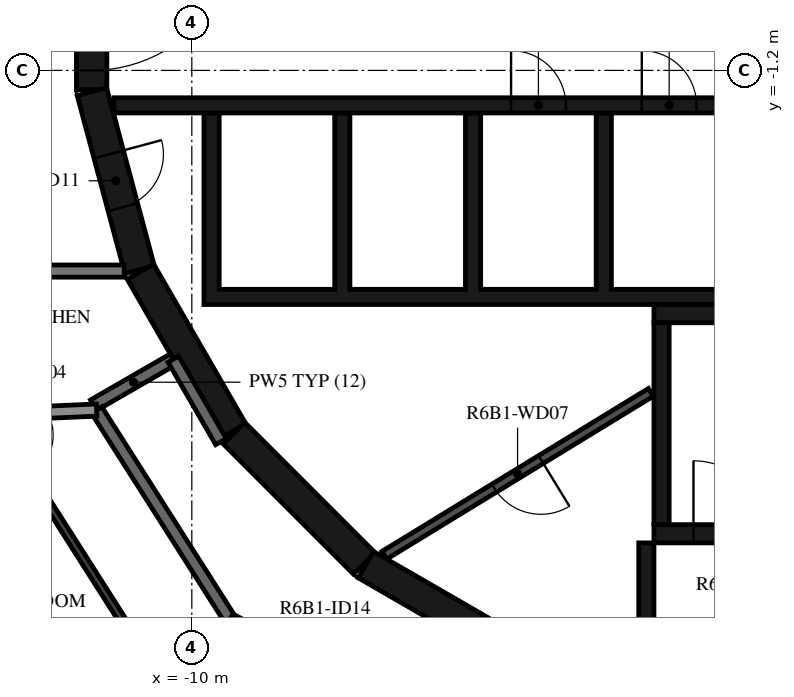
"""IFC4 building model, lengths in metres.
Left out: names, types, materials, properties, quantities, classifications, styles, units other than length and angle.
Written with IfcOpenShell. Run it as: python <this file> out.ifc"""

import sys

from ifc_helpers import new_model, si_unit, direction, frame, frame_2d, origin, place, context, subcontext, project, spatial, polyline, rectangle, outline, extrude, element, fill, save


model = new_model("IFC4")
c1 = context("Model", 3, precision=1e-05, world=origin(), true_north=direction((0.0, 1.0)))
c2 = subcontext(c1, "Body", "Model", "MODEL_VIEW")
j1 = project(units=[si_unit("LENGTHUNIT", "METRE"), si_unit("PLANEANGLEUNIT", "RADIAN")], contexts=[c1])
p1 = place(None, origin())
s1 = spatial("IfcSite", under=j1, at=p1, CompositionType="ELEMENT")
p2 = place(p1, origin())
s2 = spatial("IfcBuilding", under=s1, at=p2, CompositionType="ELEMENT")
p3 = place(p2, frame((0.0, 0.0, 237.2)))
s3 = spatial("IfcBuildingStorey", under=s2, at=p3, CompositionType="ELEMENT", Elevation=237.2)
p4 = place(p3, frame((-11.647, 1.516, 0.0), z_axis=(0.0, 0.0, 1.0), x_axis=(0.0, -1.0, 0.0)))
e1 = element("IfcWall", 1, at=p4, inside=s3, PredefinedType="SHEAR", context=c2, shape_type="SweptSolid", body=[
    extrude(rectangle(XDim=3.033, YDim=0.5, at=frame_2d((1.516, 0.0))), origin(), (0.0, 0.0, 1.0), 3.12),
])
p5 = place(p4, frame((0.316, 0.0, 0.0)))
e2 = element("IfcOpeningElement", 2, at=p5, cuts=e1, PredefinedType="OPENING", context=c2, shape_type="SweptSolid", body=[
    extrude(rectangle(XDim=2.4, YDim=2.1, at=frame_2d((1.2, 1.05))), frame((0.0, 0.26, 0.0), z_axis=(0.0, -1.0, 0.0), x_axis=(1.0, 0.0, 0.0)), (0.0, 0.0, 1.0), 0.52),
])
p6 = place(p3, frame((-11.643, -1.55, 0.0), z_axis=(0.0, 0.0, 1.0), x_axis=(0.258734743916, -0.965948410781, 0.0)))
e3 = element("IfcWall", 3, at=p6, inside=s3, PredefinedType="SHEAR", context=c2, shape_type="SweptSolid", body=[
    extrude(rectangle(XDim=3.033, YDim=0.5, at=frame_2d((1.516, 0.0))), origin(), (0.0, 0.0, 1.0), 3.12),
])
p7 = place(p6, frame((1.066, 0.0, 0.0)))
e4 = element("IfcOpeningElement", 4, at=p7, cuts=e3, PredefinedType="OPENING", context=c2, shape_type="SweptSolid", body=[
    extrude(rectangle(XDim=0.9, YDim=2.1, at=frame_2d((0.45, 1.05))), frame((0.0, 0.26, 0.0), z_axis=(0.0, -1.0, 0.0), x_axis=(1.0, 0.0, 0.0)), (0.0, 0.0, 1.0), 0.52),
])
p8 = place(p3, frame((-10.845, -4.51, 0.0), z_axis=(0.0, 0.0, 1.0), x_axis=(0.500087131594, -0.865975092491, 0.0)))
e5 = element("IfcWall", 5, at=p8, inside=s3, PredefinedType="SHEAR", context=c2, shape_type="SweptSolid", body=[
    extrude(rectangle(XDim=3.033, YDim=0.5, at=frame_2d((1.516, 0.0))), origin(), (0.0, 0.0, 1.0), 3.12),
])
p9 = place(p3, frame((-9.308, -7.164, 0.0), z_axis=(0.0, 0.0, 1.0), x_axis=(0.707106781187, -0.707106781187, 0.0)))
e6 = element("IfcWall", 6, at=p9, inside=s3, PredefinedType="SHEAR", context=c2, shape_type="SweptSolid", body=[
    extrude(rectangle(XDim=3.032, YDim=0.5, at=frame_2d((1.516, 0.0))), origin(), (0.0, 0.0, 1.0), 3.12),
])
p10 = place(p3, frame((-7.137, -9.329, 0.0), z_axis=(0.0, 0.0, 1.0), x_axis=(0.865975092491, -0.500087131594, 0.0)))
e7 = element("IfcWall", 7, at=p10, inside=s3, PredefinedType="SHEAR", context=c2, shape_type="SweptSolid", body=[
    extrude(rectangle(XDim=3.033, YDim=0.5, at=frame_2d((1.516, 0.0))), origin(), (0.0, 0.0, 1.0), 3.12),
])
p11 = place(p3, frame((-2.275, -8.67, 0.0), z_axis=(0.0, 0.0, 1.0), x_axis=(0.0, 1.0, 0.0)))
e8 = element("IfcWall", 8, at=p11, inside=s3, PredefinedType="SHEAR", context=c2, shape_type="SweptSolid", body=[
    extrude(rectangle(XDim=3.32, YDim=0.25, at=frame_2d((1.66, 0.0))), origin(), (0.0, 0.0, 1.0), 3.12),
])
p12 = place(p3, frame((-2.4, -5.2, 0.0), z_axis=(0.0, 0.0, 1.0), x_axis=(1.0, 0.0, 0.0)))
e9 = element("IfcWall", 9, at=p12, inside=s3, PredefinedType="SHEAR", context=c2, shape_type="SweptSolid", body=[
    extrude(rectangle(XDim=7.05, YDim=0.3, at=frame_2d((3.525, 0.0))), origin(), (0.0, 0.0, 1.0), 3.12),
])
p13 = place(p3, frame((-2.4, -8.82, 0.0), z_axis=(0.0, 0.0, 1.0), x_axis=(1.0, 0.0, 0.0)))
e10 = element("IfcWall", 10, at=p13, inside=s3, PredefinedType="SHEAR", context=c2, shape_type="SweptSolid", body=[
    extrude(rectangle(XDim=2.5, YDim=0.3, at=frame_2d((1.25, 0.0))), origin(), (0.0, 0.0, 1.0), 3.12),
])
p14 = place(p13, frame((0.65, 0.0, 0.0)))
e11 = element("IfcOpeningElement", 11, at=p14, cuts=e10, PredefinedType="OPENING", context=c2, shape_type="SweptSolid", body=[
    extrude(rectangle(XDim=1.2, YDim=2.1, at=frame_2d((0.6, 1.05))), frame((0.0, 0.16, 0.0), z_axis=(0.0, -1.0, 0.0), x_axis=(1.0, 0.0, 0.0)), (0.0, 0.0, 1.0), 0.32),
])
p15 = place(p3, frame((-2.525, -8.97, 0.0), z_axis=(0.0, 0.0, 1.0), x_axis=(0.0, -1.0, 0.0)))
e12 = element("IfcWall", 12, at=p15, inside=s3, PredefinedType="SHEAR", context=c2, shape_type="SweptSolid", body=[
    extrude(rectangle(XDim=2.11, YDim=0.25, at=frame_2d((1.055, 0.0))), origin(), (0.0, 0.0, 1.0), 3.12),
])
p16 = place(p3, origin())
e13 = element("IfcWall", 13, at=p16, inside=s3, PredefinedType="SHEAR", context=c2, shape_type="SweptSolid", body=[
    extrude(outline(polyline([(9.8, -5.05), (9.8, -4.8), (9.8, -1.9), (9.55, -1.9), (9.55, -4.8), (7.65, -4.8), (7.65, -1.9), (7.4, -1.9), (7.4, -4.8), (5.5, -4.8), (5.5, -1.9), (5.25, -1.9), (5.25, -4.8), (3.35, -4.8), (3.35, -1.9), (3.1, -1.9), (3.1, -4.8), (1.2, -4.8), (1.2, -1.9), (0.95, -1.9), (0.95, -4.8), (-0.95, -4.8), (-0.95, -1.9), (-1.2, -1.9), (-1.2, -4.8), (-3.1, -4.8), (-3.1, -1.9), (-3.35, -1.9), (-3.35, -4.8), (-5.25, -4.8), (-5.25, -1.9), (-5.5, -1.9), (-5.5, -4.8), (-7.4, -4.8), (-7.4, -1.9), (-7.65, -1.9), (-7.65, -4.8), (-9.55, -4.8), (-9.55, -1.9), (-9.8, -1.9), (-9.8, -4.8), (-9.8, -5.05), (9.8, -5.05)])), origin(), (0.0, 0.0, 1.0), 3.12),
])
p17 = place(p3, frame((-11.28, -1.775, 0.0), z_axis=(0.0, 0.0, 1.0), x_axis=(1.0, 0.0, 0.0)))
e14 = element("IfcWall", 14, at=p17, inside=s3, PredefinedType="SHEAR", context=c2, shape_type="SweptSolid", body=[
    extrude(rectangle(XDim=14.38, YDim=0.25, at=frame_2d((7.19, 0.0))), origin(), (0.0, 0.0, 1.0), 3.12),
])
p18 = place(p17, frame((12.88, 0.0, 0.0)))
e15 = element("IfcOpeningElement", 15, at=p18, cuts=e14, PredefinedType="OPENING", context=c2, shape_type="SweptSolid", body=[
    extrude(rectangle(XDim=1.1, YDim=2.1, at=frame_2d((0.55, 1.05))), frame((0.0, 0.135, 0.0), z_axis=(0.0, -1.0, 0.0), x_axis=(1.0, 0.0, 0.0)), (0.0, 0.0, 1.0), 0.27),
])
p19 = place(p17, frame((6.53, 0.0, 0.0)))
e16 = element("IfcOpeningElement", 16, at=p19, cuts=e14, PredefinedType="OPENING", context=c2, shape_type="SweptSolid", body=[
    extrude(rectangle(XDim=0.9, YDim=2.1, at=frame_2d((0.45, 1.05))), frame((0.0, 0.135, 0.0), z_axis=(0.0, -1.0, 0.0), x_axis=(1.0, 0.0, 0.0)), (0.0, 0.0, 1.0), 0.27),
])
p20 = place(p17, frame((8.68, 0.0, 0.0)))
e17 = element("IfcOpeningElement", 17, at=p20, cuts=e14, PredefinedType="OPENING", context=c2, shape_type="SweptSolid", body=[
    extrude(rectangle(XDim=0.9, YDim=2.1, at=frame_2d((0.45, 1.05))), frame((0.0, 0.135, 0.0), z_axis=(0.0, -1.0, 0.0), x_axis=(1.0, 0.0, 0.0)), (0.0, 0.0, 1.0), 0.27),
])
p21 = place(p17, frame((10.83, 0.0, 0.0)))
e18 = element("IfcOpeningElement", 18, at=p21, cuts=e14, PredefinedType="OPENING", context=c2, shape_type="SweptSolid", body=[
    extrude(rectangle(XDim=0.9, YDim=2.1, at=frame_2d((0.45, 1.05))), frame((0.0, 0.135, 0.0), z_axis=(0.0, -1.0, 0.0), x_axis=(1.0, 0.0, 0.0)), (0.0, 0.0, 1.0), 0.27),
])
p22 = place(p3, frame((-2.451, -6.495, 0.0), z_axis=(0.0, 0.0, 1.0), x_axis=(-0.853250115418, -0.521501908471, 0.0)))
e19 = element("IfcWall", 19, at=p22, inside=s3, PredefinedType="PARTITIONING", context=c2, shape_type="SweptSolid", body=[
    extrude(rectangle(XDim=5.137, YDim=0.15, at=frame_2d((2.569, 0.0))), origin(), (0.0, 0.0, 1.0), 3.12),
])
p23 = place(p22, frame((2.119, 0.0, 0.0)))
e20 = element("IfcOpeningElement", 20, at=p23, cuts=e19, PredefinedType="OPENING", context=c2, shape_type="SweptSolid", body=[
    extrude(rectangle(XDim=0.9, YDim=2.1, at=frame_2d((0.45, 1.05))), frame((0.0, 0.085, 0.0), z_axis=(0.0, -1.0, 0.0), x_axis=(1.0, 0.0, 0.0)), (0.0, 0.0, 1.0), 0.17),
])
p24 = place(p3, frame((-10.303, -5.949, 0.0), z_axis=(0.0, 0.0, 1.0), x_axis=(-0.866043382451, -0.499968858743, 0.0)))
e21 = element("IfcWall", 21, at=p24, inside=s3, PredefinedType="STANDARD", context=c2, shape_type="SweptSolid", body=[
    extrude(rectangle(XDim=1.515, YDim=0.2, at=frame_2d((0.758, 0.0))), origin(), (0.0, 0.0, 1.0), 3.12),
])
p25 = place(p3, frame((-9.52, -7.305, 0.0), z_axis=(0.0, 0.0, 1.0), x_axis=(-0.500028278809, 0.866009076391, 0.0)))
e22 = element("IfcWall", 22, at=p25, inside=s3, PredefinedType="STANDARD", context=c2, shape_type="SweptSolid", body=[
    extrude(rectangle(XDim=1.566, YDim=0.2, at=frame_2d((0.783, 0.0))), origin(), (0.0, 0.0, 1.0), 3.12),
])
p26 = place(p3, frame((-11.565, -6.786, 0.0), z_axis=(0.0, 0.0, 1.0), x_axis=(0.537297327359, -0.843392898958, 0.0)))
e23 = element("IfcWall", 23, at=p26, inside=s3, PredefinedType="STANDARD", context=c2, shape_type="SweptSolid", body=[
    extrude(rectangle(XDim=4.081, YDim=0.2, at=frame_2d((2.041, 0.0))), origin(), (0.0, 0.0, 1.0), 3.12),
])
p27 = place(p3, frame((-9.372, -10.228, 0.0), z_axis=(0.0, 0.0, 1.0), x_axis=(0.887005184532, -0.461759464021, 0.0)))
e24 = element("IfcWall", 24, at=p27, inside=s3, PredefinedType="STANDARD", context=c2, shape_type="SweptSolid", body=[
    extrude(rectangle(XDim=7.181, YDim=0.2, at=frame_2d((3.591, 0.0))), origin(), (0.0, 0.0, 1.0), 3.12),
])
p28 = place(p27, frame((2.391, 0.0, 0.0)))
e25 = element("IfcOpeningElement", 25, at=p28, cuts=e24, PredefinedType="OPENING", context=c2, shape_type="SweptSolid", body=[
    extrude(rectangle(XDim=1.0, YDim=2.1, at=frame_2d((0.5, 1.05))), frame((0.0, 0.11, 0.0), z_axis=(0.0, -1.0, 0.0), x_axis=(1.0, 0.0, 0.0)), (0.0, 0.0, 1.0), 0.22),
])
p29 = place(p3, frame((-17.655, -4.5, 0.0), z_axis=(0.0, 0.0, 1.0), x_axis=(1.0, 0.0, 0.0)))
e26 = element("IfcWall", 26, at=p29, inside=s3, PredefinedType="STANDARD", context=c2, shape_type="SweptSolid", body=[
    extrude(rectangle(XDim=6.543, YDim=0.2, at=frame_2d((3.272, 0.0))), origin(), (0.0, 0.0, 1.0), 3.12),
])
p30 = place(p3, frame((-17.544, -7.047, 0.0), z_axis=(0.0, 0.0, 1.0), x_axis=(0.999046743906, 0.043653218555, 0.0)))
e27 = element("IfcWall", 27, at=p30, inside=s3, PredefinedType="STANDARD", context=c2, shape_type="SweptSolid", body=[
    extrude(rectangle(XDim=5.984, YDim=0.2, at=frame_2d((2.992, 0.0))), origin(), (0.0, 0.0, 1.0), 2.73),
])
p31 = place(p3, frame((-13.295, -6.862, 0.0), z_axis=(0.0, 0.0, 1.0), x_axis=(0.537285929223, -0.84340016022, 0.0)))
e28 = element("IfcWall", 28, at=p31, inside=s3, PredefinedType="PARTITIONING", context=c2, shape_type="SweptSolid", body=[
    extrude(rectangle(XDim=5.349, YDim=0.12, at=frame_2d((2.675, 0.0))), origin(), (0.0, 0.0, 1.0), 3.12),
])
p32 = place(p31, frame((0.4, 0.0, 0.0)))
e29 = element("IfcOpeningElement", 29, at=p32, cuts=e28, PredefinedType="OPENING", context=c2, shape_type="SweptSolid", body=[
    extrude(rectangle(XDim=0.8, YDim=2.1, at=frame_2d((0.4, 1.05))), frame((0.0, 0.07, 0.0), z_axis=(0.0, -1.0, 0.0), x_axis=(1.0, 0.0, 0.0)), (0.0, 0.0, 1.0), 0.14),
])
p33 = place(p14, origin())
e30 = element("IfcDoor", 30, at=p33, inside=s3, OperationType="SINGLE_SWING_LEFT", PredefinedType="DOOR", context=c2, shape_type="SweptSolid", body=[
    extrude(rectangle(XDim=1.2, YDim=2.1, at=frame_2d((0.6, 1.05))), frame((0.0, 0.025, 0.0), z_axis=(0.0, -1.0, 0.0), x_axis=(1.0, 0.0, 0.0)), (0.0, 0.0, 1.0), 0.05),
])
fill(e11, e30)
p34 = place(p5, origin())
e31 = element("IfcDoor", 31, at=p34, inside=s3, OperationType="DOUBLE_DOOR_SINGLE_SWING", PredefinedType="DOOR", context=c2, shape_type="SweptSolid", body=[
    extrude(rectangle(XDim=2.4, YDim=2.1, at=frame_2d((1.2, 1.05))), frame((0.0, 0.025, 0.0), z_axis=(0.0, -1.0, 0.0), x_axis=(1.0, 0.0, 0.0)), (0.0, 0.0, 1.0), 0.05),
])
fill(e2, e31)
p35 = place(p19, origin())
e32 = element("IfcDoor", 32, at=p35, inside=s3, OperationType="SINGLE_SWING_RIGHT", PredefinedType="DOOR", context=c2, shape_type="SweptSolid", body=[
    extrude(rectangle(XDim=0.9, YDim=2.1, at=frame_2d((0.45, 1.05))), frame((0.0, 0.025, 0.0), z_axis=(0.0, -1.0, 0.0), x_axis=(1.0, 0.0, 0.0)), (0.0, 0.0, 1.0), 0.05),
])
fill(e16, e32)
p36 = place(p20, origin())
e33 = element("IfcDoor", 33, at=p36, inside=s3, OperationType="SINGLE_SWING_LEFT", PredefinedType="DOOR", context=c2, shape_type="SweptSolid", body=[
    extrude(rectangle(XDim=0.9, YDim=2.1, at=frame_2d((0.45, 1.05))), frame((0.0, 0.025, 0.0), z_axis=(0.0, -1.0, 0.0), x_axis=(1.0, 0.0, 0.0)), (0.0, 0.0, 1.0), 0.05),
])
fill(e17, e33)
p37 = place(p23, origin())
e34 = element("IfcDoor", 34, at=p37, inside=s3, OperationType="SINGLE_SWING_LEFT", PredefinedType="DOOR", context=c2, shape_type="SweptSolid", body=[
    extrude(rectangle(XDim=0.9, YDim=2.1, at=frame_2d((0.45, 1.05))), frame((0.0, 0.025, 0.0), z_axis=(0.0, -1.0, 0.0), x_axis=(1.0, 0.0, 0.0)), (0.0, 0.0, 1.0), 0.05),
])
fill(e20, e34)
p38 = place(p7, origin())
e35 = element("IfcDoor", 35, at=p38, inside=s3, OperationType="SINGLE_SWING_LEFT", PredefinedType="DOOR", context=c2, shape_type="SweptSolid", body=[
    extrude(rectangle(XDim=0.9, YDim=2.1, at=frame_2d((0.45, 1.05))), frame((0.0, 0.025, 0.0), z_axis=(0.0, -1.0, 0.0), x_axis=(1.0, 0.0, 0.0)), (0.0, 0.0, 1.0), 0.05),
])
fill(e4, e35)
save(model, sys.argv[1])
